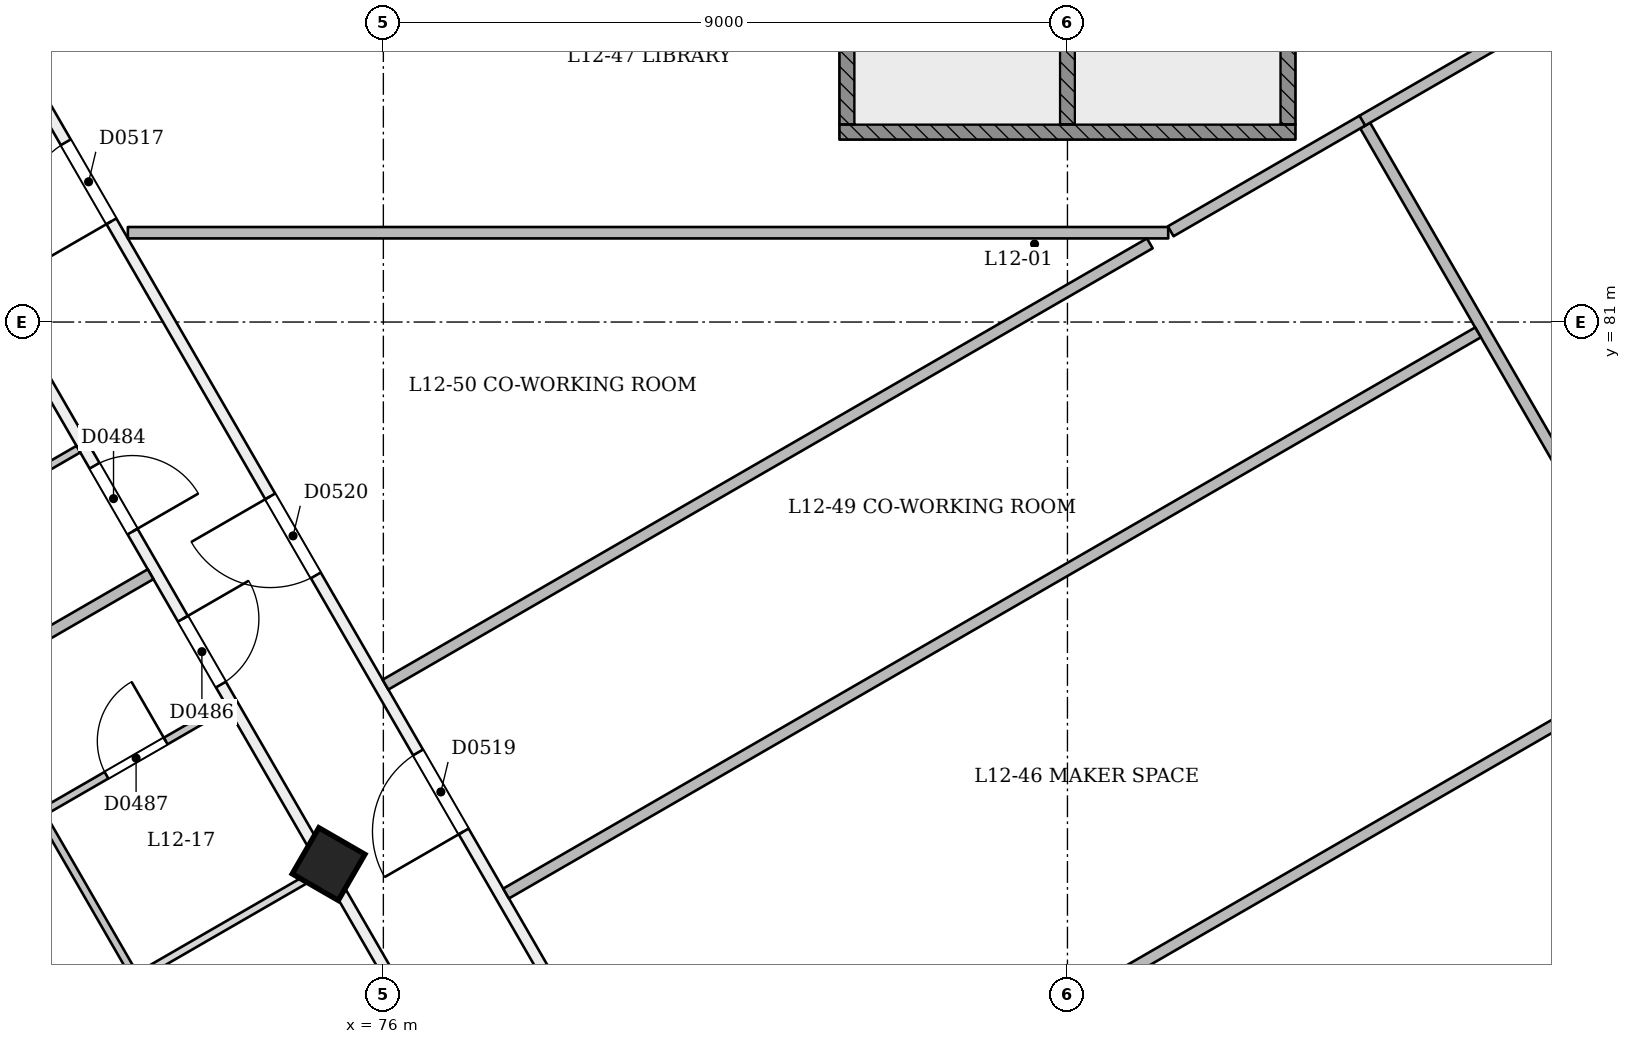
"""IFC4 building model, lengths in metres.
Left out: names, types, materials, properties, quantities, classifications, styles, units other than length and angle.
Written with IfcOpenShell. Run it as: python <this file> out.ifc"""

import sys

from ifc_helpers import new_model, si_unit, direction, frame, frame_2d, origin, origin_2d, place, context, subcontext, project, spatial, rectangle, extrude, element, fill, save


model = new_model("IFC4")
c1 = context("Model", 3, precision=1e-05, world=origin(), true_north=direction((0.0, 1.0)))
c2 = subcontext(c1, "Body", "Model", "MODEL_VIEW")
j1 = project(units=[si_unit("LENGTHUNIT", "METRE"), si_unit("PLANEANGLEUNIT", "RADIAN")], contexts=[c1])
p1 = place(None, origin())
s1 = spatial("IfcSite", under=j1, at=p1, CompositionType="ELEMENT")
p2 = place(p1, origin())
s2 = spatial("IfcBuilding", under=s1, at=p2, CompositionType="ELEMENT")
p3 = place(p2, frame((0.0, 0.0, 52.2)))
s3 = spatial("IfcBuildingStorey", under=s2, at=p3, CompositionType="ELEMENT", Elevation=52.2)
p4 = place(p3, frame((75.252, 73.822, -0.021), z_axis=(0.022153634206, 0.038480930364, 0.999013730882), x_axis=(-0.864982432441, -0.500326616032, 0.038453463537)))
e1 = element("IfcColumn", 1, at=p4, inside=s3, PredefinedType="COLUMN", context=c2, shape_type="SweptSolid", body=[
    extrude(rectangle(XDim=0.7, YDim=0.7, at=origin_2d()), origin(), (0.0, 0.0, 1.0), 3.604),
])
p5 = place(p3, frame((64.002, 93.308, 0.0), z_axis=(0.0, 0.0, 1.0), x_axis=(0.49999948646, -0.866025700277, 0.0)))
e2 = element("IfcWall", 2, at=p5, inside=s3, PredefinedType="PARTITIONING", context=c2, shape_type="SweptSolid", body=[
    extrude(rectangle(XDim=38.6, YDim=0.15, at=frame_2d((19.3, 0.0))), origin(), (0.0, 0.0, 1.0), 2.7),
])
p6 = place(p5, frame((0.605, 0.0, 0.0)))
e3 = element("IfcOpeningElement", 3, at=p6, cuts=e2, PredefinedType="OPENING", context=c2, shape_type="SweptSolid", body=[
    extrude(rectangle(XDim=1.0, YDim=2.1, at=frame_2d((0.5, 1.05))), frame((0.0, 0.085, 0.0), z_axis=(0.0, -1.0, 0.0), x_axis=(1.0, 0.0, 0.0)), (0.0, 0.0, 1.0), 0.171),
])
p7 = place(p5, frame((7.28, 0.0, 0.0)))
e4 = element("IfcOpeningElement", 4, at=p7, cuts=e2, PredefinedType="OPENING", context=c2, shape_type="SweptSolid", body=[
    extrude(rectangle(XDim=1.0, YDim=2.1, at=frame_2d((0.5, 1.05))), frame((0.0, 0.085, 0.0), z_axis=(0.0, -1.0, 0.0), x_axis=(1.0, 0.0, 0.0)), (0.0, 0.0, 1.0), 0.171),
])
p8 = place(p5, frame((9.72, 0.0, 0.0)))
e5 = element("IfcOpeningElement", 5, at=p8, cuts=e2, PredefinedType="OPENING", context=c2, shape_type="SweptSolid", body=[
    extrude(rectangle(XDim=1.0, YDim=2.1, at=frame_2d((0.5, 1.05))), frame((0.0, 0.085, 0.0), z_axis=(0.0, -1.0, 0.0), x_axis=(1.0, 0.0, 0.0)), (0.0, 0.0, 1.0), 0.171),
])
p9 = place(p5, frame((16.395, 0.0, 0.0)))
e6 = element("IfcOpeningElement", 6, at=p9, cuts=e2, PredefinedType="OPENING", context=c2, shape_type="SweptSolid", body=[
    extrude(rectangle(XDim=1.0, YDim=2.1, at=frame_2d((0.5, 1.05))), frame((0.0, 0.085, 0.0), z_axis=(0.0, -1.0, 0.0), x_axis=(1.0, 0.0, 0.0)), (0.0, 0.0, 1.0), 0.171),
])
p10 = place(p5, frame((18.72, 0.0, 0.0)))
e7 = element("IfcOpeningElement", 7, at=p10, cuts=e2, PredefinedType="OPENING", context=c2, shape_type="SweptSolid", body=[
    extrude(rectangle(XDim=1.0, YDim=2.1, at=frame_2d((0.5, 1.05))), frame((0.0, 0.085, 0.0), z_axis=(0.0, -1.0, 0.0), x_axis=(1.0, 0.0, 0.0)), (0.0, 0.0, 1.0), 0.171),
])
p11 = place(p5, frame((25.395, 0.0, 0.0)))
e8 = element("IfcOpeningElement", 8, at=p11, cuts=e2, PredefinedType="OPENING", context=c2, shape_type="SweptSolid", body=[
    extrude(rectangle(XDim=1.0, YDim=2.1, at=frame_2d((0.5, 1.05))), frame((0.0, 0.085, 0.0), z_axis=(0.0, -1.0, 0.0), x_axis=(1.0, 0.0, 0.0)), (0.0, 0.0, 1.0), 0.171),
])
p12 = place(p5, frame((27.605, 0.0, 0.0)))
e9 = element("IfcOpeningElement", 9, at=p12, cuts=e2, PredefinedType="OPENING", context=c2, shape_type="SweptSolid", body=[
    extrude(rectangle(XDim=1.0, YDim=2.1, at=frame_2d((0.5, 1.05))), frame((0.0, 0.085, 0.0), z_axis=(0.0, -1.0, 0.0), x_axis=(1.0, 0.0, 0.0)), (0.0, 0.0, 1.0), 0.171),
])
p13 = place(p5, frame((34.28, 0.0, 0.0)))
e10 = element("IfcOpeningElement", 10, at=p13, cuts=e2, PredefinedType="OPENING", context=c2, shape_type="SweptSolid", body=[
    extrude(rectangle(XDim=1.0, YDim=2.1, at=frame_2d((0.5, 1.05))), frame((0.0, 0.085, 0.0), z_axis=(0.0, -1.0, 0.0), x_axis=(1.0, 0.0, 0.0)), (0.0, 0.0, 1.0), 0.171),
])
p14 = place(p5, frame((37.324, 0.0, 0.0)))
e11 = element("IfcOpeningElement", 11, at=p14, cuts=e2, PredefinedType="OPENING", context=c2, shape_type="SweptSolid", body=[
    extrude(rectangle(XDim=1.0, YDim=2.1, at=frame_2d((0.5, 1.05))), frame((0.0, 0.085, 0.0), z_axis=(0.0, -1.0, 0.0), x_axis=(1.0, 0.0, 0.0)), (0.0, 0.0, 1.0), 0.171),
])
p15 = place(p3, frame((86.05, 58.757, 0.0), z_axis=(0.0, 0.0, 1.0), x_axis=(0.499999296855, 0.866025809745, 0.0)))
e12 = element("IfcWall", 12, at=p15, inside=s3, PredefinedType="PARTITIONING", context=c2, shape_type="SweptSolid", body=[
    extrude(rectangle(XDim=43.792, YDim=0.15, at=frame_2d((21.896, 0.0))), origin(), (0.0, 0.0, 1.0), 2.7),
])
p16 = place(p15, frame((3.598, 0.0, 0.0)))
e13 = element("IfcOpeningElement", 13, at=p16, cuts=e12, PredefinedType="OPENING", context=c2, shape_type="SweptSolid", body=[
    extrude(rectangle(XDim=1.2, YDim=2.1, at=frame_2d((0.6, 1.05))), frame((0.0, 0.085, 0.0), z_axis=(0.0, -1.0, 0.0), x_axis=(1.0, 0.0, 0.0)), (0.0, 0.0, 1.0), 0.171),
])
p17 = place(p15, frame((11.176, 0.0, 0.0)))
e14 = element("IfcOpeningElement", 14, at=p17, cuts=e12, PredefinedType="OPENING", context=c2, shape_type="SweptSolid", body=[
    extrude(rectangle(XDim=1.0, YDim=2.1, at=frame_2d((0.5, 1.05))), frame((0.0, 0.085, 0.0), z_axis=(0.0, -1.0, 0.0), x_axis=(1.0, 0.0, 0.0)), (0.0, 0.0, 1.0), 0.171),
])
p18 = place(p15, frame((13.616, 0.0, 0.0)))
e15 = element("IfcOpeningElement", 15, at=p18, cuts=e12, PredefinedType="OPENING", context=c2, shape_type="SweptSolid", body=[
    extrude(rectangle(XDim=1.0, YDim=2.1, at=frame_2d((0.5, 1.05))), frame((0.0, 0.085, 0.0), z_axis=(0.0, -1.0, 0.0), x_axis=(1.0, 0.0, 0.0)), (0.0, 0.0, 1.0), 0.171),
])
p19 = place(p15, frame((20.176, 0.0, 0.0)))
e16 = element("IfcOpeningElement", 16, at=p19, cuts=e12, PredefinedType="OPENING", context=c2, shape_type="SweptSolid", body=[
    extrude(rectangle(XDim=1.0, YDim=2.1, at=frame_2d((0.5, 1.05))), frame((0.0, 0.085, 0.0), z_axis=(0.0, -1.0, 0.0), x_axis=(1.0, 0.0, 0.0)), (0.0, 0.0, 1.0), 0.171),
])
p20 = place(p15, frame((22.616, 0.0, 0.0)))
e17 = element("IfcOpeningElement", 17, at=p20, cuts=e12, PredefinedType="OPENING", context=c2, shape_type="SweptSolid", body=[
    extrude(rectangle(XDim=1.0, YDim=2.1, at=frame_2d((0.5, 1.05))), frame((0.0, 0.085, 0.0), z_axis=(0.0, -1.0, 0.0), x_axis=(1.0, 0.0, 0.0)), (0.0, 0.0, 1.0), 0.171),
])
p21 = place(p15, frame((29.176, 0.0, 0.0)))
e18 = element("IfcOpeningElement", 18, at=p21, cuts=e12, PredefinedType="OPENING", context=c2, shape_type="SweptSolid", body=[
    extrude(rectangle(XDim=1.0, YDim=2.1, at=frame_2d((0.5, 1.05))), frame((0.0, 0.085, 0.0), z_axis=(0.0, -1.0, 0.0), x_axis=(1.0, 0.0, 0.0)), (0.0, 0.0, 1.0), 0.171),
])
p22 = place(p15, frame((31.616, 0.0, 0.0)))
e19 = element("IfcOpeningElement", 19, at=p22, cuts=e12, PredefinedType="OPENING", context=c2, shape_type="SweptSolid", body=[
    extrude(rectangle(XDim=1.0, YDim=2.1, at=frame_2d((0.5, 1.05))), frame((0.0, 0.085, 0.0), z_axis=(0.0, -1.0, 0.0), x_axis=(1.0, 0.0, 0.0)), (0.0, 0.0, 1.0), 0.171),
])
p23 = place(p15, frame((38.176, 0.0, 0.0)))
e20 = element("IfcOpeningElement", 20, at=p23, cuts=e12, PredefinedType="OPENING", context=c2, shape_type="SweptSolid", body=[
    extrude(rectangle(XDim=1.0, YDim=2.1, at=frame_2d((0.5, 1.05))), frame((0.0, 0.085, 0.0), z_axis=(0.0, -1.0, 0.0), x_axis=(1.0, 0.0, 0.0)), (0.0, 0.0, 1.0), 0.171),
])
p24 = place(p15, frame((41.344, 0.0, 0.0)))
e21 = element("IfcOpeningElement", 21, at=p24, cuts=e12, PredefinedType="OPENING", context=c2, shape_type="SweptSolid", body=[
    extrude(rectangle(XDim=1.0, YDim=2.1, at=frame_2d((0.5, 1.05))), frame((0.0, 0.085, 0.0), z_axis=(0.0, -1.0, 0.0), x_axis=(1.0, 0.0, 0.0)), (0.0, 0.0, 1.0), 0.171),
])
p25 = place(p3, frame((85.0, 60.54, 0.0), z_axis=(0.0, 0.0, 1.0), x_axis=(-0.500000084694, 0.866025354886, 0.0)))
e22 = element("IfcWall", 22, at=p25, inside=s3, PredefinedType="PARTITIONING", context=c2, shape_type="SweptSolid", body=[
    extrude(rectangle(XDim=34.711, YDim=0.15, at=frame_2d((17.355, 0.0))), origin(), (0.0, 0.0, 1.0), 3.1),
])
p26 = place(p25, frame((5.966, 0.0, 0.0)))
e23 = element("IfcOpeningElement", 23, at=p26, cuts=e22, PredefinedType="OPENING", context=c2, shape_type="SweptSolid", body=[
    extrude(rectangle(XDim=1.2, YDim=2.1, at=frame_2d((0.6, 1.05))), frame((0.0, 0.085, 0.0), z_axis=(0.0, -1.0, 0.0), x_axis=(1.0, 0.0, 0.0)), (0.0, 0.0, 1.0), 0.171),
])
p27 = place(p25, frame((11.813, 0.0, 0.0)))
e24 = element("IfcOpeningElement", 24, at=p27, cuts=e22, PredefinedType="OPENING", context=c2, shape_type="SweptSolid", body=[
    extrude(rectangle(XDim=1.2, YDim=2.1, at=frame_2d((0.6, 1.05))), frame((0.0, 0.085, 0.0), z_axis=(0.0, -1.0, 0.0), x_axis=(1.0, 0.0, 0.0)), (0.0, 0.0, 1.0), 0.171),
])
p28 = place(p25, frame((25.156, 0.0, 0.0)))
e25 = element("IfcOpeningElement", 25, at=p28, cuts=e22, PredefinedType="OPENING", context=c2, shape_type="SweptSolid", body=[
    extrude(rectangle(XDim=1.2, YDim=2.1, at=frame_2d((0.6, 1.05))), frame((0.0, 0.085, 0.0), z_axis=(0.0, -1.0, 0.0), x_axis=(1.0, 0.0, 0.0)), (0.0, 0.0, 1.0), 0.171),
])
p29 = place(p25, frame((30.288, 0.0, 0.0)))
e26 = element("IfcOpeningElement", 26, at=p29, cuts=e22, PredefinedType="OPENING", context=c2, shape_type="SweptSolid", body=[
    extrude(rectangle(XDim=1.2, YDim=2.1, at=frame_2d((0.6, 1.05))), frame((0.0, 0.085, 0.0), z_axis=(0.0, -1.0, 0.0), x_axis=(1.0, 0.0, 0.0)), (0.0, 0.0, 1.0), 0.171),
])
p30 = place(p25, frame((15.887, 0.0, 0.0)))
e27 = element("IfcOpeningElement", 27, at=p30, cuts=e22, PredefinedType="OPENING", context=c2, shape_type="SweptSolid", body=[
    extrude(rectangle(XDim=1.2, YDim=2.1, at=frame_2d((0.6, 1.05))), frame((0.0, 0.085, 0.0), z_axis=(0.0, -1.0, 0.0), x_axis=(1.0, 0.0, 0.0)), (0.0, 0.0, 1.0), 0.171),
])
p31 = place(p25, frame((19.777, 0.0, 0.0)))
e28 = element("IfcOpeningElement", 28, at=p31, cuts=e22, PredefinedType="OPENING", context=c2, shape_type="SweptSolid", body=[
    extrude(rectangle(XDim=1.2, YDim=2.1, at=frame_2d((0.6, 1.05))), frame((0.0, 0.085, 0.0), z_axis=(0.0, -1.0, 0.0), x_axis=(1.0, 0.0, 0.0)), (0.0, 0.0, 1.0), 0.171),
])
p32 = place(p3, frame((102.355, 90.6, 0.0), z_axis=(0.0, 0.0, 1.0), x_axis=(-0.500000924128, -0.866024870238, 0.0)))
e29 = element("IfcWall", 29, at=p32, inside=s3, PredefinedType="PARTITIONING", context=c2, shape_type="SweptSolid", body=[
    extrude(rectangle(XDim=34.581, YDim=0.15, at=frame_2d((17.291, 0.0))), origin(), (0.0, 0.0, 1.0), 3.1),
])
p33 = place(p32, frame((9.118, 0.0, 0.0)))
e30 = element("IfcOpeningElement", 30, at=p33, cuts=e29, PredefinedType="OPENING", context=c2, shape_type="SweptSolid", body=[
    extrude(rectangle(XDim=1.2, YDim=2.1, at=frame_2d((0.6, 1.05))), frame((0.0, 0.085, 0.0), z_axis=(0.0, -1.0, 0.0), x_axis=(1.0, 0.0, 0.0)), (0.0, 0.0, 1.0), 0.171),
])
p34 = place(p3, frame((71.988, 79.328, 0.0), z_axis=(0.0, 0.0, 1.0), x_axis=(-0.865989585315, -0.500062034277, 0.0)))
e31 = element("IfcWall", 31, at=p34, inside=s3, PredefinedType="PARTITIONING", context=c2, shape_type="SweptSolid", body=[
    extrude(rectangle(XDim=2.925, YDim=0.1, at=frame_2d((1.462, 0.0))), origin(), (0.0, 0.0, 1.0), 3.1),
])
p35 = place(p34, frame((0.975, 0.0, 0.0)))
e32 = element("IfcOpeningElement", 32, at=p35, cuts=e31, PredefinedType="OPENING", context=c2, shape_type="SweptSolid", body=[
    extrude(rectangle(XDim=0.9, YDim=2.1, at=frame_2d((0.45, 1.05))), frame((0.0, 0.061, 0.0), z_axis=(0.0, -1.0, 0.0), x_axis=(1.0, 0.0, 0.0)), (0.0, 0.0, 1.0), 0.121),
])
p36 = place(p3, frame((67.442, 74.51, 0.0), z_axis=(0.0, 0.0, 1.0), x_axis=(0.866025401434, 0.500000004071, 0.0)))
e33 = element("IfcWall", 33, at=p36, inside=s3, PredefinedType="PARTITIONING", context=c2, shape_type="SweptSolid", body=[
    extrude(rectangle(XDim=6.345, YDim=0.15, at=frame_2d((3.173, 0.0))), origin(), (0.0, 0.0, 1.0), 2.6),
])
p37 = place(p3, frame((72.741, 72.373, 0.0), z_axis=(0.0, 0.0, 1.0), x_axis=(-0.500004234368, 0.866022959057, 0.0)))
e34 = element("IfcWall", 34, at=p37, inside=s3, PredefinedType="PARTITIONING", context=c2, shape_type="SweptSolid", body=[
    extrude(rectangle(XDim=2.5, YDim=0.1, at=frame_2d((1.25, 0.0))), origin(), (0.0, 0.0, 1.0), 2.7),
])
p38 = place(p3, frame((71.491, 74.538, 0.0), z_axis=(0.0, 0.0, 1.0), x_axis=(0.866048868473, 0.499959355765, 0.0)))
e35 = element("IfcWall", 35, at=p38, inside=s3, PredefinedType="PARTITIONING", context=c2, shape_type="SweptSolid", body=[
    extrude(rectangle(XDim=2.825, YDim=0.1, at=frame_2d((1.413, 0.0))), origin(), (0.0, 0.0, 1.0), 3.1),
])
p39 = place(p38, frame((1.0, 0.0, 0.0)))
e36 = element("IfcOpeningElement", 36, at=p39, cuts=e35, PredefinedType="OPENING", context=c2, shape_type="SweptSolid", body=[
    extrude(rectangle(XDim=0.9, YDim=2.1, at=frame_2d((0.45, 1.05))), frame((0.0, 0.061, 0.0), z_axis=(0.0, -1.0, 0.0), x_axis=(1.0, 0.0, 0.0)), (0.0, 0.0, 1.0), 0.121),
])
p40 = place(p3, frame((72.724, 72.363, 0.0), z_axis=(0.0, 0.0, 1.0), x_axis=(0.866026948466, 0.499997324523, 0.0)))
e37 = element("IfcWall", 37, at=p40, inside=s3, PredefinedType="PARTITIONING", context=c2, shape_type="SweptSolid", body=[
    extrude(rectangle(XDim=2.845, YDim=0.1, at=frame_2d((1.422, 0.0))), origin(), (0.0, 0.0, 1.0), 2.7),
])
p41 = place(p3, frame((92.954, 76.593, 0.0), z_axis=(0.0, 0.0, 1.0), x_axis=(-0.866027508988, -0.499996353663, 0.0)))
e38 = element("IfcWall", 38, at=p41, inside=s3, PredefinedType="PARTITIONING", context=c2, shape_type="SweptSolid", body=[
    extrude(rectangle(XDim=14.84, YDim=0.15, at=frame_2d((7.42, 0.0))), origin(), (0.0, 0.0, 1.0), 3.1),
])
p42 = place(p3, frame((88.917, 83.584, 0.0), z_axis=(0.0, 0.0, 1.0), x_axis=(0.499986679841, -0.866033094045, 0.0)))
e39 = element("IfcWall", 39, at=p42, inside=s3, PredefinedType="PARTITIONING", context=c2, shape_type="SweptSolid", body=[
    extrude(rectangle(XDim=7.998, YDim=0.15, at=frame_2d((3.999, 0.0))), origin(), (0.0, 0.0, 1.0), 3.1),
])
p43 = place(p3, frame((100.676, 90.46, 0.0), z_axis=(0.0, 0.0, 1.0), x_axis=(-0.866019571687, -0.500010101354, 0.0)))
e40 = element("IfcWall", 40, at=p43, inside=s3, PredefinedType="PARTITIONING", context=c2, shape_type="SweptSolid", body=[
    extrude(rectangle(XDim=13.641, YDim=0.15, at=frame_2d((6.82, 0.0))), origin(), (0.0, 0.0, 1.0), 3.1),
])
p44 = place(p3, frame((90.401, 80.864, 0.0), z_axis=(0.0, 0.0, 1.0), x_axis=(-0.866026427659, -0.499998226593, 0.0)))
e41 = element("IfcWall", 41, at=p44, inside=s3, PredefinedType="PARTITIONING", context=c2, shape_type="SweptSolid", body=[
    extrude(rectangle(XDim=14.765, YDim=0.15, at=frame_2d((7.382, 0.0))), origin(), (0.0, 0.0, 1.0), 3.1),
])
p45 = place(p3, frame((86.358, 82.194, 0.0), z_axis=(0.0, 0.0, 1.0), x_axis=(0.86603616059, 0.499981368203, 0.0)))
e42 = element("IfcWall", 42, at=p45, inside=s3, PredefinedType="PARTITIONING", context=c2, shape_type="SweptSolid", body=[
    extrude(rectangle(XDim=2.911, YDim=0.15, at=frame_2d((1.456, 0.0))), origin(), (0.0, 0.0, 1.0), 3.1),
])
p46 = place(p3, frame((72.639, 82.175, 0.0), z_axis=(0.0, 0.0, 1.0), x_axis=(1.0, 0.0, 0.0)))
e43 = element("IfcWall", 43, at=p46, inside=s3, PredefinedType="PARTITIONING", context=c2, shape_type="SweptSolid", body=[
    extrude(rectangle(XDim=13.687, YDim=0.15, at=frame_2d((6.844, 0.0))), origin(), (0.0, 0.0, 1.0), 3.1),
])
p47 = place(p3, frame((86.083, 82.035, 0.0), z_axis=(0.0, 0.0, 1.0), x_axis=(-0.866028367734, -0.499994866253, 0.0)))
e44 = element("IfcWall", 44, at=p47, inside=s3, PredefinedType="PARTITIONING", context=c2, shape_type="SweptSolid", body=[
    extrude(rectangle(XDim=11.611, YDim=0.15, at=frame_2d((5.805, 0.0))), origin(), (0.0, 0.0, 1.0), 3.1),
])
p48 = place(p3, frame((82.0, 83.5, 0.0), z_axis=(0.0, 0.0, 1.0), x_axis=(1.0, 0.0, 0.0)))
e45 = element("IfcWall", 45, at=p48, inside=s3, PredefinedType="SOLIDWALL", context=c2, shape_type="SweptSolid", body=[
    extrude(rectangle(XDim=6.0, YDim=0.2, at=frame_2d((3.0, 0.0))), origin(), (0.0, 0.0, 1.0), 3.1),
])
for number, where, z_axis, x_axis in (
    (46, (82.1, 83.6, 0.0), (0.0, 0.0, 1.0), (0.0, 1.0, 0.0)),
    (47, (87.9, 83.6, 0.0), (0.0, 0.0, 1.0), (0.0, 1.0, 0.0)),
    (48, (85.0, 83.6, 0.0), (0.0, 0.0, 1.0), (0.0, 1.0, 0.0)),
):
    element("IfcWall", number, at=place(p3, frame(where, z_axis=z_axis, x_axis=x_axis)), inside=s3, PredefinedType="SOLIDWALL", context=c2, shape_type="SweptSolid", body=[
        extrude(rectangle(XDim=6.8, YDim=0.2, at=frame_2d((3.4, 0.0))), origin(), (0.0, 0.0, 1.0), 3.1),
    ])
p49 = place(p9, origin())
e49 = element("IfcDoor", 49, at=p49, inside=s3, OperationType="SINGLE_SWING_RIGHT", PredefinedType="NOTDEFINED", context=c2, shape_type="SweptSolid", body=[
    extrude(rectangle(XDim=1.0, YDim=2.1, at=frame_2d((0.5, 1.05))), frame((0.0, 0.025, 0.0), z_axis=(0.0, -1.0, 0.0), x_axis=(1.0, 0.0, 0.0)), (0.0, 0.0, 1.0), 0.05),
])
fill(e6, e49)
p50 = place(p10, origin())
e50 = element("IfcDoor", 50, at=p50, inside=s3, OperationType="SINGLE_SWING_LEFT", PredefinedType="NOTDEFINED", context=c2, shape_type="SweptSolid", body=[
    extrude(rectangle(XDim=1.0, YDim=2.1, at=frame_2d((0.5, 1.05))), frame((0.0, 0.025, 0.0), z_axis=(0.0, -1.0, 0.0), x_axis=(1.0, 0.0, 0.0)), (0.0, 0.0, 1.0), 0.05),
])
fill(e7, e50)
p51 = place(p39, origin())
e51 = element("IfcDoor", 51, at=p51, inside=s3, OperationType="SINGLE_SWING_RIGHT", PredefinedType="NOTDEFINED", context=c2, shape_type="SweptSolid", body=[
    extrude(rectangle(XDim=0.9, YDim=2.1, at=frame_2d((0.45, 1.05))), frame((0.0, 0.025, 0.0), z_axis=(0.0, -1.0, 0.0), x_axis=(1.0, 0.0, 0.0)), (0.0, 0.0, 1.0), 0.05),
])
fill(e36, e51)
p52 = place(p28, origin())
e52 = element("IfcDoor", 52, at=p52, inside=s3, OperationType="SINGLE_SWING_LEFT", PredefinedType="NOTDEFINED", context=c2, shape_type="SweptSolid", body=[
    extrude(rectangle(XDim=1.2, YDim=2.1, at=frame_2d((0.6, 1.05))), frame((0.0, 0.025, 0.0), z_axis=(0.0, -1.0, 0.0), x_axis=(1.0, 0.0, 0.0)), (0.0, 0.0, 1.0), 0.05),
])
fill(e25, e52)
p53 = place(p30, origin())
e53 = element("IfcDoor", 53, at=p53, inside=s3, OperationType="SINGLE_SWING_LEFT", PredefinedType="NOTDEFINED", context=c2, shape_type="SweptSolid", body=[
    extrude(rectangle(XDim=1.2, YDim=2.1, at=frame_2d((0.6, 1.05))), frame((0.0, 0.025, 0.0), z_axis=(0.0, -1.0, 0.0), x_axis=(1.0, 0.0, 0.0)), (0.0, 0.0, 1.0), 0.05),
])
fill(e27, e53)
p54 = place(p31, origin())
e54 = element("IfcDoor", 54, at=p54, inside=s3, OperationType="SINGLE_SWING_RIGHT", PredefinedType="NOTDEFINED", context=c2, shape_type="SweptSolid", body=[
    extrude(rectangle(XDim=1.2, YDim=2.1, at=frame_2d((0.6, 1.05))), frame((0.0, 0.025, 0.0), z_axis=(0.0, -1.0, 0.0), x_axis=(1.0, 0.0, 0.0)), (0.0, 0.0, 1.0), 0.05),
])
fill(e28, e54)
save(model, sys.argv[1])
